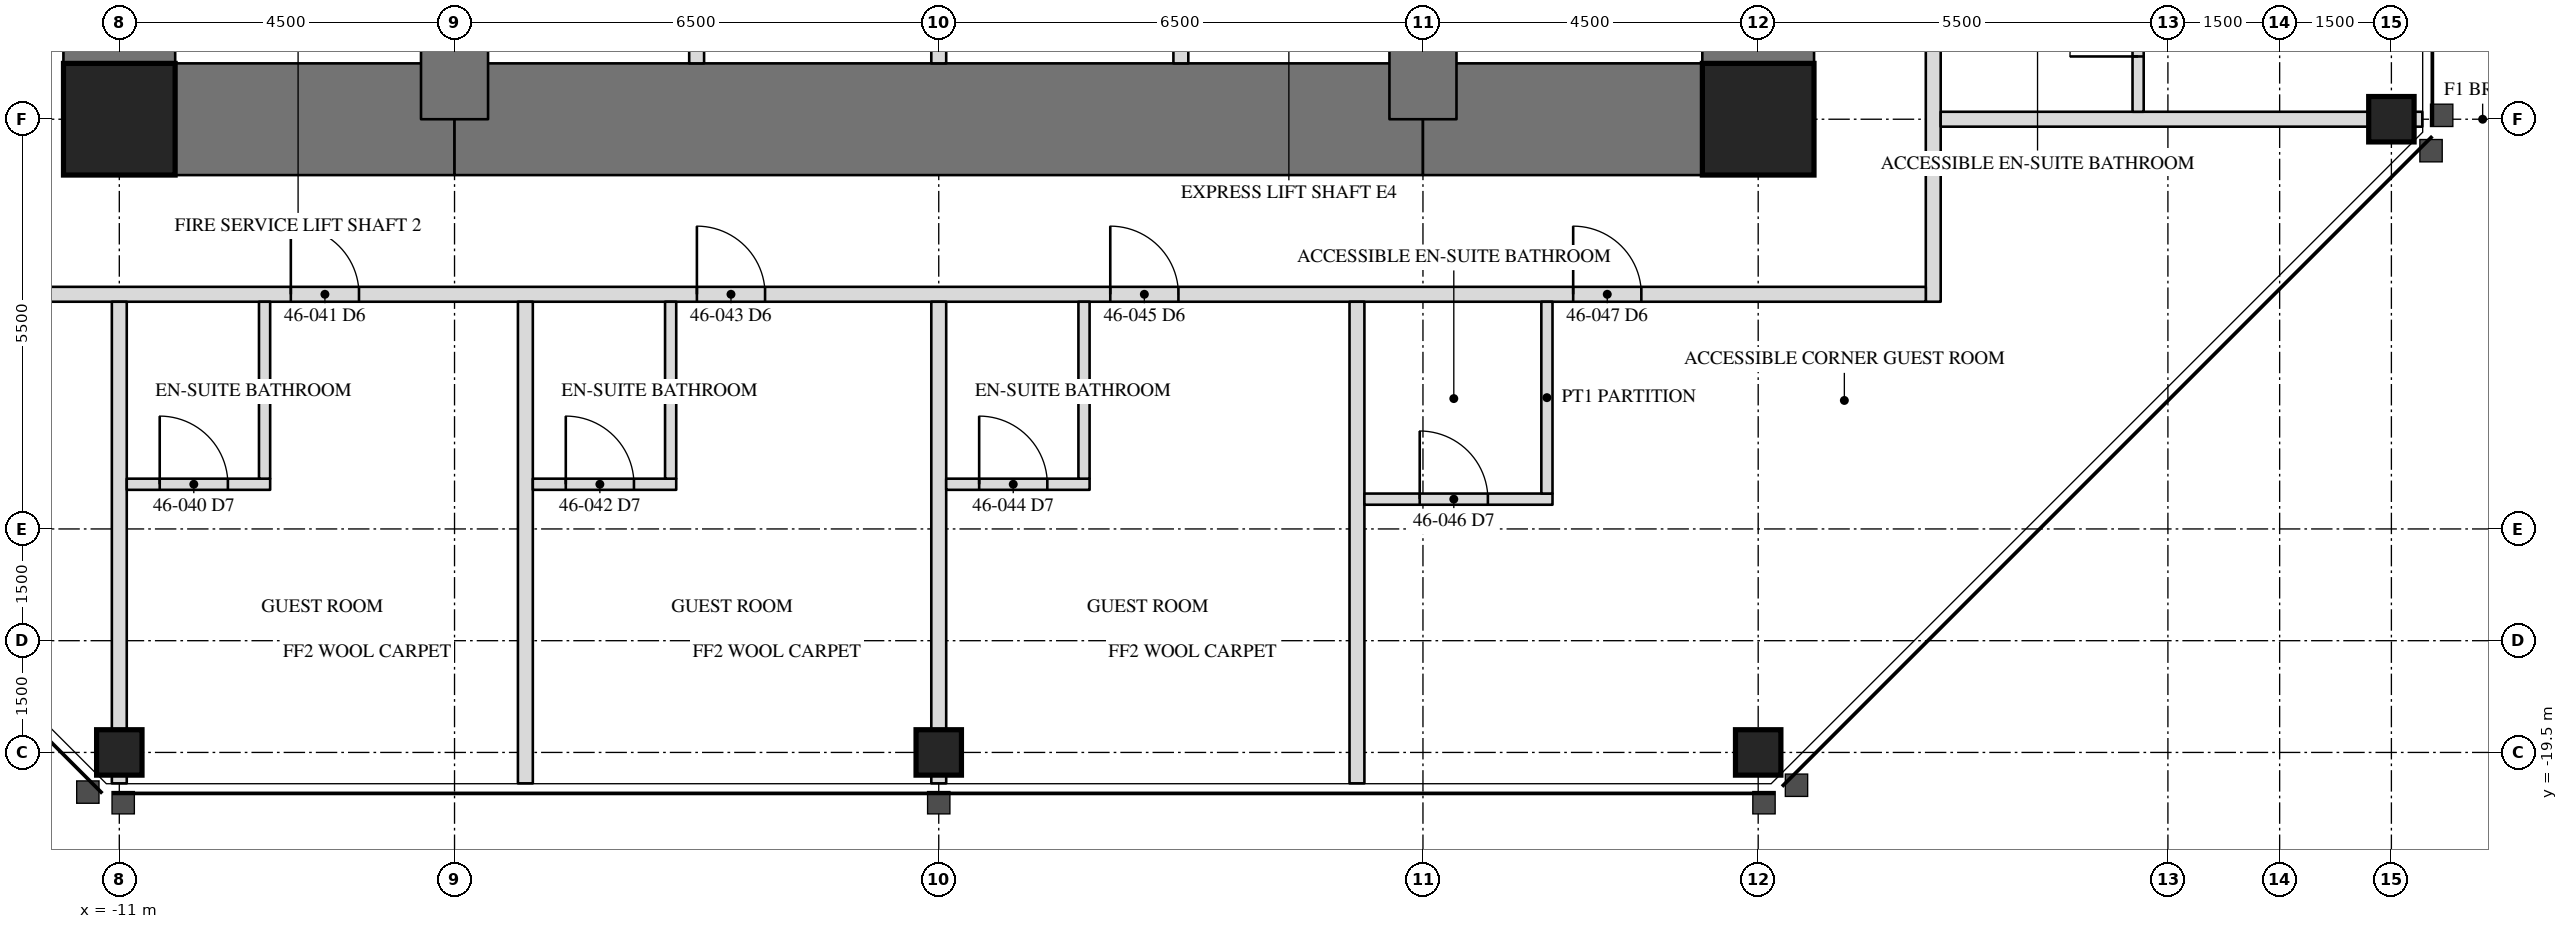
"""IFC4 building model, lengths in metres.
Left out: names, types, materials, properties, quantities, classifications, styles, units other than length and angle.
Written with IfcOpenShell. Run it as: python <this file> out.ifc"""

import sys

from ifc_helpers import new_model, si_unit, direction, frame, frame_2d, origin, origin_2d, place, context, subcontext, project, spatial, rectangle, hollow_rectangle, extrude, element, fill, save


model = new_model("IFC4")
c1 = context("Model", 3, precision=1e-05, world=origin(), true_north=direction((0.0, 1.0)))
c2 = subcontext(c1, "Body", "Model", "MODEL_VIEW")
j1 = project(units=[si_unit("LENGTHUNIT", "METRE"), si_unit("PLANEANGLEUNIT", "RADIAN")], contexts=[c1])
p1 = place(None, origin())
s1 = spatial("IfcSite", under=j1, at=p1, CompositionType="ELEMENT")
p2 = place(p1, origin())
s2 = spatial("IfcBuilding", under=s1, at=p2, CompositionType="ELEMENT")
p3 = place(p2, frame((0.0, 0.0, 197.7)))
s3 = spatial("IfcBuildingStorey", under=s2, at=p3, CompositionType="ELEMENT", Elevation=197.7)
for number, where, z_axis, x_axis in (
    (1, (-11.0, -19.5, 0.0), (0.0, 0.0, 1.0), (1.0, 0.0, 0.0)),
    (2, (0.0, -19.5, 0.0), (0.0, 0.0, 1.0), (1.0, 0.0, 0.0)),
    (3, (11.0, -19.5, 0.0), (0.0, 0.0, 1.0), (1.0, 0.0, 0.0)),
    (4, (19.5, -11.0, 0.0), (0.0, 0.0, 1.0), (0.0, 1.0, 0.0)),
):
    element("IfcColumn", number, at=place(p3, frame(where, z_axis=z_axis, x_axis=x_axis)), inside=s3, PredefinedType="COLUMN", context=c2, shape_type="SweptSolid", body=[
        extrude(hollow_rectangle(XDim=0.61, YDim=0.61, WallThickness=0.076, at=origin_2d()), origin(), (0.0, 0.0, 1.0), 3.5),
    ])
p4 = place(p3, frame((11.0, -11.0, 0.0), z_axis=(0.0, 0.0, 1.0), x_axis=(0.0, 1.0, 0.0)))
e5 = element("IfcWall", 5, at=p4, inside=s3, PredefinedType="SHEAR", context=c2, shape_type="SweptSolid", body=[
    extrude(rectangle(XDim=22.0, YDim=1.5, at=frame_2d((11.0, 0.0))), origin(), (0.0, 0.0, 1.0), 3.5),
])
p5 = place(p4, frame((15.393, 0.0, 0.0)))
e6 = element("IfcOpeningElement", 6, at=p5, cuts=e5, PredefinedType="OPENING", context=c2, shape_type="SweptSolid", body=[
    extrude(rectangle(XDim=0.915, YDim=2.134, at=frame_2d((0.458, 1.067))), frame((0.0, 0.76, 0.0), z_axis=(0.0, -1.0, 0.0), x_axis=(1.0, 0.0, 0.0)), (0.0, 0.0, 1.0), 1.52),
])
p6 = place(p3, frame((-11.0, 11.0, 0.0), z_axis=(0.0, 0.0, 1.0), x_axis=(0.0, -1.0, 0.0)))
e7 = element("IfcWall", 7, at=p6, inside=s3, PredefinedType="SHEAR", context=c2, shape_type="SweptSolid", body=[
    extrude(rectangle(XDim=22.0, YDim=1.5, at=frame_2d((11.0, 0.0))), origin(), (0.0, 0.0, 1.0), 3.5),
])
p7 = place(p6, frame((15.393, 0.0, 0.0)))
e8 = element("IfcOpeningElement", 8, at=p7, cuts=e7, PredefinedType="OPENING", context=c2, shape_type="SweptSolid", body=[
    extrude(rectangle(XDim=0.915, YDim=2.134, at=frame_2d((0.458, 1.067))), frame((0.0, 0.76, 0.0), z_axis=(0.0, -1.0, 0.0), x_axis=(1.0, 0.0, 0.0)), (0.0, 0.0, 1.0), 1.52),
])
p8 = place(p3, frame((-11.0, -11.0, 0.0), z_axis=(0.0, 0.0, 1.0), x_axis=(1.0, 0.0, 0.0)))
e9 = element("IfcWall", 9, at=p8, inside=s3, PredefinedType="SHEAR", context=c2, shape_type="SweptSolid", body=[
    extrude(rectangle(XDim=4.5, YDim=1.5, at=frame_2d((2.25, 0.0))), origin(), (0.0, 0.0, 1.0), 3.5),
])
p9 = place(p3, frame((-6.5, -11.0, 0.0), z_axis=(0.0, 0.0, 1.0), x_axis=(1.0, 0.0, 0.0)))
e10 = element("IfcWall", 10, at=p9, inside=s3, PredefinedType="SHEAR", context=c2, shape_type="SweptSolid", body=[
    extrude(rectangle(XDim=13.0, YDim=1.5, at=frame_2d((6.5, 0.0))), origin(), (0.0, 0.0, 1.0), 3.5),
])
p10 = place(p3, frame((6.5, -11.0, 0.0), z_axis=(0.0, 0.0, 1.0), x_axis=(1.0, 0.0, 0.0)))
e11 = element("IfcWall", 11, at=p10, inside=s3, PredefinedType="SHEAR", context=c2, shape_type="SweptSolid", body=[
    extrude(rectangle(XDim=4.5, YDim=1.5, at=frame_2d((2.25, 0.0))), origin(), (0.0, 0.0, 1.0), 3.5),
])
for number, where, z_axis, x_axis in (
    (12, (6.5, -11.0, 0.0), (0.0, 0.0, 1.0), (0.0, 1.0, 0.0)),
    (13, (-6.5, -6.5, 0.0), (0.0, 0.0, 1.0), (0.0, -1.0, 0.0)),
):
    element("IfcWall", number, at=place(p3, frame(where, z_axis=z_axis, x_axis=x_axis)), inside=s3, PredefinedType="SHEAR", context=c2, shape_type="SweptSolid", body=[
        extrude(rectangle(XDim=4.5, YDim=0.9, at=frame_2d((2.25, 0.0))), origin(), (0.0, 0.0, 1.0), 3.5),
    ])
for number, where, z_axis, x_axis in (
    (14, (-11.0, -11.0, 0.0), (0.0, 0.0, 1.0), (1.0, 0.0, 0.0)),
    (15, (11.0, -11.0, 0.0), (0.0, 0.0, 1.0), (1.0, 0.0, 0.0)),
):
    element("IfcColumn", number, at=place(p3, frame(where, z_axis=z_axis, x_axis=x_axis)), inside=s3, PredefinedType="COLUMN", context=c2, shape_type="SweptSolid", body=[
        extrude(hollow_rectangle(XDim=1.499, YDim=1.499, WallThickness=0.102, at=origin_2d()), origin(), (0.0, 0.0, 1.0), 3.5),
    ])
for number, where, z_axis, x_axis in (
    (16, (-3.25, -10.25, 0.0), (0.0, 0.0, 1.0), (0.0, 1.0, 0.0)),
    (17, (0.0, -10.25, 0.0), (0.0, 0.0, 1.0), (0.0, 1.0, 0.0)),
    (18, (3.25, -10.25, 0.0), (0.0, 0.0, 1.0), (0.0, 1.0, 0.0)),
):
    element("IfcWall", number, at=place(p3, frame(where, z_axis=z_axis, x_axis=x_axis)), inside=s3, PredefinedType="PARTITIONING", context=c2, shape_type="SweptSolid", body=[
        extrude(rectangle(XDim=3.3, YDim=0.2, at=frame_2d((1.65, 0.0))), origin(), (0.0, 0.0, 1.0), 3.31),
    ])
p11 = place(p3, frame((13.35, -13.45, 0.0), z_axis=(0.0, 0.0, 1.0), x_axis=(0.0, 1.0, 0.0)))
e19 = element("IfcWall", 19, at=p11, inside=s3, PredefinedType="PARTITIONING", context=c2, shape_type="SweptSolid", body=[
    extrude(rectangle(XDim=26.7, YDim=0.2, at=frame_2d((13.35, 0.0))), origin(), (0.0, 0.0, 1.0), 3.31),
])
p12 = place(p11, frame((5.353, 0.0, 0.0)))
e20 = element("IfcOpeningElement", 20, at=p12, cuts=e19, PredefinedType="OPENING", context=c2, shape_type="SweptSolid", body=[
    extrude(rectangle(XDim=0.915, YDim=2.134, at=frame_2d((0.458, 1.067))), frame((0.0, 0.11, 0.0), z_axis=(0.0, -1.0, 0.0), x_axis=(1.0, 0.0, 0.0)), (0.0, 0.0, 1.0), 0.22),
])
p13 = place(p11, frame((10.204, 0.0, 0.0)))
e21 = element("IfcOpeningElement", 21, at=p13, cuts=e19, PredefinedType="OPENING", context=c2, shape_type="SweptSolid", body=[
    extrude(rectangle(XDim=0.915, YDim=2.134, at=frame_2d((0.458, 1.067))), frame((0.0, 0.11, 0.0), z_axis=(0.0, -1.0, 0.0), x_axis=(1.0, 0.0, 0.0)), (0.0, 0.0, 1.0), 0.22),
])
p14 = place(p11, frame((15.752, 0.0, 0.0)))
e22 = element("IfcOpeningElement", 22, at=p14, cuts=e19, PredefinedType="OPENING", context=c2, shape_type="SweptSolid", body=[
    extrude(rectangle(XDim=0.915, YDim=2.134, at=frame_2d((0.458, 1.067))), frame((0.0, 0.11, 0.0), z_axis=(0.0, -1.0, 0.0), x_axis=(1.0, 0.0, 0.0)), (0.0, 0.0, 1.0), 0.22),
])
p15 = place(p11, frame((21.366, 0.0, 0.0)))
e23 = element("IfcOpeningElement", 23, at=p15, cuts=e19, PredefinedType="OPENING", context=c2, shape_type="SweptSolid", body=[
    extrude(rectangle(XDim=0.915, YDim=2.134, at=frame_2d((0.458, 1.067))), frame((0.0, 0.11, 0.0), z_axis=(0.0, -1.0, 0.0), x_axis=(1.0, 0.0, 0.0)), (0.0, 0.0, 1.0), 0.22),
])
p16 = place(p3, frame((-13.45, -13.35, 0.0), z_axis=(0.0, 0.0, 1.0), x_axis=(1.0, 0.0, 0.0)))
e24 = element("IfcWall", 24, at=p16, inside=s3, PredefinedType="PARTITIONING", context=c2, shape_type="SweptSolid", body=[
    extrude(rectangle(XDim=26.7, YDim=0.2, at=frame_2d((13.35, 0.0))), origin(), (0.0, 0.0, 1.0), 3.31),
])
p17 = place(p16, frame((4.752, 0.0, 0.0)))
e25 = element("IfcOpeningElement", 25, at=p17, cuts=e24, PredefinedType="OPENING", context=c2, shape_type="SweptSolid", body=[
    extrude(rectangle(XDim=0.915, YDim=2.134, at=frame_2d((0.458, 1.067))), frame((0.0, 0.11, 0.0), z_axis=(0.0, -1.0, 0.0), x_axis=(1.0, 0.0, 0.0)), (0.0, 0.0, 1.0), 0.22),
])
p18 = place(p16, frame((10.204, 0.0, 0.0)))
e26 = element("IfcOpeningElement", 26, at=p18, cuts=e24, PredefinedType="OPENING", context=c2, shape_type="SweptSolid", body=[
    extrude(rectangle(XDim=0.915, YDim=2.134, at=frame_2d((0.458, 1.067))), frame((0.0, 0.11, 0.0), z_axis=(0.0, -1.0, 0.0), x_axis=(1.0, 0.0, 0.0)), (0.0, 0.0, 1.0), 0.22),
])
p19 = place(p16, frame((15.752, 0.0, 0.0)))
e27 = element("IfcOpeningElement", 27, at=p19, cuts=e24, PredefinedType="OPENING", context=c2, shape_type="SweptSolid", body=[
    extrude(rectangle(XDim=0.915, YDim=2.134, at=frame_2d((0.458, 1.067))), frame((0.0, 0.11, 0.0), z_axis=(0.0, -1.0, 0.0), x_axis=(1.0, 0.0, 0.0)), (0.0, 0.0, 1.0), 0.22),
])
p20 = place(p16, frame((21.967, 0.0, 0.0)))
e28 = element("IfcOpeningElement", 28, at=p20, cuts=e24, PredefinedType="OPENING", context=c2, shape_type="SweptSolid", body=[
    extrude(rectangle(XDim=0.915, YDim=2.134, at=frame_2d((0.458, 1.067))), frame((0.0, 0.11, 0.0), z_axis=(0.0, -1.0, 0.0), x_axis=(1.0, 0.0, 0.0)), (0.0, 0.0, 1.0), 0.22),
])
p21 = place(p3, frame((13.45, -11.0, 0.0), z_axis=(0.0, 0.0, 1.0), x_axis=(1.0, 0.0, 0.0)))
e29 = element("IfcWall", 29, at=p21, inside=s3, PredefinedType="PARTITIONING", context=c2, shape_type="SweptSolid", body=[
    extrude(rectangle(XDim=6.465, YDim=0.2, at=frame_2d((3.232, 0.0))), origin(), (0.0, 0.0, 1.0), 2.802),
])
p22 = place(p3, frame((16.1, -10.9, 0.0), z_axis=(0.0, 0.0, 1.0), x_axis=(0.0, 1.0, 0.0)))
e30 = element("IfcWall", 30, at=p22, inside=s3, PredefinedType="PARTITIONING", context=c2, shape_type="SweptSolid", body=[
    extrude(rectangle(XDim=2.525, YDim=0.15, at=frame_2d((1.262, 0.0))), origin(), (0.0, 0.0, 1.0), 3.31),
])
p23 = place(p22, frame((0.742, 0.0, 0.0)))
e31 = element("IfcOpeningElement", 31, at=p23, cuts=e30, PredefinedType="OPENING", context=c2, shape_type="SweptSolid", body=[
    extrude(rectangle(XDim=0.915, YDim=2.032, at=frame_2d((0.458, 1.016))), frame((0.0, 0.085, 0.0), z_axis=(0.0, -1.0, 0.0), x_axis=(1.0, 0.0, 0.0)), (0.0, 0.0, 1.0), 0.17),
])
p24 = place(p3, frame((-11.0, -13.45, 0.0), z_axis=(0.0, 0.0, 1.0), x_axis=(0.0, -1.0, 0.0)))
e32 = element("IfcWall", 32, at=p24, inside=s3, PredefinedType="PARTITIONING", context=c2, shape_type="SweptSolid", body=[
    extrude(rectangle(XDim=6.465, YDim=0.2, at=frame_2d((3.232, 0.0))), origin(), (0.0, 0.0, 1.0), 2.802),
])
p25 = place(p3, frame((-5.549, -13.45, 0.0), z_axis=(0.0, 0.0, 1.0), x_axis=(0.0, -1.0, 0.0)))
e33 = element("IfcWall", 33, at=p25, inside=s3, PredefinedType="PARTITIONING", context=c2, shape_type="SweptSolid", body=[
    extrude(rectangle(XDim=6.465, YDim=0.2, at=frame_2d((3.232, 0.0))), origin(), (0.0, 0.0, 1.0), 3.31),
])
p26 = place(p3, frame((0.0, -13.45, 0.0), z_axis=(0.0, 0.0, 1.0), x_axis=(0.0, -1.0, 0.0)))
e34 = element("IfcWall", 34, at=p26, inside=s3, PredefinedType="PARTITIONING", context=c2, shape_type="SweptSolid", body=[
    extrude(rectangle(XDim=6.465, YDim=0.2, at=frame_2d((3.232, 0.0))), origin(), (0.0, 0.0, 1.0), 2.802),
])
p27 = place(p3, frame((5.614, -13.45, 0.0), z_axis=(0.0, 0.0, 1.0), x_axis=(0.0, -1.0, 0.0)))
e35 = element("IfcWall", 35, at=p27, inside=s3, PredefinedType="PARTITIONING", context=c2, shape_type="SweptSolid", body=[
    extrude(rectangle(XDim=6.465, YDim=0.2, at=frame_2d((3.232, 0.0))), origin(), (0.0, 0.0, 1.0), 3.31),
])
p28 = place(p3, frame((-10.9, -15.9, 0.0), z_axis=(0.0, 0.0, 1.0), x_axis=(1.0, 0.0, 0.0)))
e36 = element("IfcWall", 36, at=p28, inside=s3, PredefinedType="PARTITIONING", context=c2, shape_type="SweptSolid", body=[
    extrude(rectangle(XDim=1.925, YDim=0.15, at=frame_2d((0.962, 0.0))), origin(), (0.0, 0.0, 1.0), 3.31),
])
p29 = place(p28, frame((0.442, 0.0, 0.0)))
e37 = element("IfcOpeningElement", 37, at=p29, cuts=e36, PredefinedType="OPENING", context=c2, shape_type="SweptSolid", body=[
    extrude(rectangle(XDim=0.915, YDim=2.032, at=frame_2d((0.458, 1.016))), frame((0.0, 0.085, 0.0), z_axis=(0.0, -1.0, 0.0), x_axis=(1.0, 0.0, 0.0)), (0.0, 0.0, 1.0), 0.17),
])
p30 = place(p3, frame((-9.05, -13.45, 0.0), z_axis=(0.0, 0.0, 1.0), x_axis=(0.0, -1.0, 0.0)))
e38 = element("IfcWall", 38, at=p30, inside=s3, PredefinedType="PARTITIONING", context=c2, shape_type="SweptSolid", body=[
    extrude(rectangle(XDim=2.375, YDim=0.15, at=frame_2d((1.188, 0.0))), origin(), (0.0, 0.0, 1.0), 3.31),
])
p31 = place(p3, frame((-5.449, -15.9, 0.0), z_axis=(0.0, 0.0, 1.0), x_axis=(1.0, 0.0, 0.0)))
e39 = element("IfcWall", 39, at=p31, inside=s3, PredefinedType="PARTITIONING", context=c2, shape_type="SweptSolid", body=[
    extrude(rectangle(XDim=1.925, YDim=0.15, at=frame_2d((0.962, 0.0))), origin(), (0.0, 0.0, 1.0), 3.31),
])
p32 = place(p31, frame((0.442, 0.0, 0.0)))
e40 = element("IfcOpeningElement", 40, at=p32, cuts=e39, PredefinedType="OPENING", context=c2, shape_type="SweptSolid", body=[
    extrude(rectangle(XDim=0.915, YDim=2.032, at=frame_2d((0.458, 1.016))), frame((0.0, 0.085, 0.0), z_axis=(0.0, -1.0, 0.0), x_axis=(1.0, 0.0, 0.0)), (0.0, 0.0, 1.0), 0.17),
])
p33 = place(p3, frame((-3.599, -13.45, 0.0), z_axis=(0.0, 0.0, 1.0), x_axis=(0.0, -1.0, 0.0)))
e41 = element("IfcWall", 41, at=p33, inside=s3, PredefinedType="PARTITIONING", context=c2, shape_type="SweptSolid", body=[
    extrude(rectangle(XDim=2.375, YDim=0.15, at=frame_2d((1.188, 0.0))), origin(), (0.0, 0.0, 1.0), 2.703),
])
p34 = place(p3, frame((0.1, -15.9, 0.0), z_axis=(0.0, 0.0, 1.0), x_axis=(1.0, 0.0, 0.0)))
e42 = element("IfcWall", 42, at=p34, inside=s3, PredefinedType="PARTITIONING", context=c2, shape_type="SweptSolid", body=[
    extrude(rectangle(XDim=1.925, YDim=0.15, at=frame_2d((0.962, 0.0))), origin(), (0.0, 0.0, 1.0), 3.31),
])
p35 = place(p34, frame((0.442, 0.0, 0.0)))
e43 = element("IfcOpeningElement", 43, at=p35, cuts=e42, PredefinedType="OPENING", context=c2, shape_type="SweptSolid", body=[
    extrude(rectangle(XDim=0.915, YDim=2.032, at=frame_2d((0.458, 1.016))), frame((0.0, 0.085, 0.0), z_axis=(0.0, -1.0, 0.0), x_axis=(1.0, 0.0, 0.0)), (0.0, 0.0, 1.0), 0.17),
])
p36 = place(p3, frame((1.95, -13.45, 0.0), z_axis=(0.0, 0.0, 1.0), x_axis=(0.0, -1.0, 0.0)))
e44 = element("IfcWall", 44, at=p36, inside=s3, PredefinedType="PARTITIONING", context=c2, shape_type="SweptSolid", body=[
    extrude(rectangle(XDim=2.375, YDim=0.15, at=frame_2d((1.188, 0.0))), origin(), (0.0, 0.0, 1.0), 3.31),
])
p37 = place(p3, frame((5.714, -16.1, 0.0), z_axis=(0.0, 0.0, 1.0), x_axis=(1.0, 0.0, 0.0)))
e45 = element("IfcWall", 45, at=p37, inside=s3, PredefinedType="PARTITIONING", context=c2, shape_type="SweptSolid", body=[
    extrude(rectangle(XDim=2.525, YDim=0.15, at=frame_2d((1.262, 0.0))), origin(), (0.0, 0.0, 1.0), 3.31),
])
p38 = place(p37, frame((0.742, 0.0, 0.0)))
e46 = element("IfcOpeningElement", 46, at=p38, cuts=e45, PredefinedType="OPENING", context=c2, shape_type="SweptSolid", body=[
    extrude(rectangle(XDim=0.915, YDim=2.032, at=frame_2d((0.458, 1.016))), frame((0.0, 0.085, 0.0), z_axis=(0.0, -1.0, 0.0), x_axis=(1.0, 0.0, 0.0)), (0.0, 0.0, 1.0), 0.17),
])
p39 = place(p3, frame((8.164, -13.45, 0.0), z_axis=(0.0, 0.0, 1.0), x_axis=(0.0, -1.0, 0.0)))
e47 = element("IfcWall", 47, at=p39, inside=s3, PredefinedType="PARTITIONING", context=c2, shape_type="SweptSolid", body=[
    extrude(rectangle(XDim=2.575, YDim=0.15, at=frame_2d((1.288, 0.0))), origin(), (0.0, 0.0, 1.0), 3.31),
])
p40 = place(p23, origin())
e48 = element("IfcDoor", 48, at=p40, inside=s3, OperationType="SINGLE_SWING_LEFT", PredefinedType="DOOR", context=c2, shape_type="SweptSolid", body=[
    extrude(rectangle(XDim=0.915, YDim=2.032, at=frame_2d((0.458, 1.016))), frame((0.0, 0.025, 0.0), z_axis=(0.0, -1.0, 0.0), x_axis=(1.0, 0.0, 0.0)), (0.0, 0.0, 1.0), 0.05),
])
fill(e31, e48)
p41 = place(p29, origin())
e49 = element("IfcDoor", 49, at=p41, inside=s3, OperationType="SINGLE_SWING_LEFT", PredefinedType="DOOR", context=c2, shape_type="SweptSolid", body=[
    extrude(rectangle(XDim=0.915, YDim=2.032, at=frame_2d((0.458, 1.016))), frame((0.0, 0.025, 0.0), z_axis=(0.0, -1.0, 0.0), x_axis=(1.0, 0.0, 0.0)), (0.0, 0.0, 1.0), 0.05),
])
fill(e37, e49)
p42 = place(p17, origin())
e50 = element("IfcDoor", 50, at=p42, inside=s3, OperationType="SINGLE_SWING_LEFT", PredefinedType="DOOR", context=c2, shape_type="SweptSolid", body=[
    extrude(rectangle(XDim=0.915, YDim=2.134, at=frame_2d((0.458, 1.067))), frame((0.0, 0.025, 0.0), z_axis=(0.0, -1.0, 0.0), x_axis=(1.0, 0.0, 0.0)), (0.0, 0.0, 1.0), 0.05),
])
fill(e25, e50)
p43 = place(p32, origin())
e51 = element("IfcDoor", 51, at=p43, inside=s3, OperationType="SINGLE_SWING_LEFT", PredefinedType="DOOR", context=c2, shape_type="SweptSolid", body=[
    extrude(rectangle(XDim=0.915, YDim=2.032, at=frame_2d((0.458, 1.016))), frame((0.0, 0.025, 0.0), z_axis=(0.0, -1.0, 0.0), x_axis=(1.0, 0.0, 0.0)), (0.0, 0.0, 1.0), 0.05),
])
fill(e40, e51)
p44 = place(p18, origin())
e52 = element("IfcDoor", 52, at=p44, inside=s3, OperationType="SINGLE_SWING_LEFT", PredefinedType="DOOR", context=c2, shape_type="SweptSolid", body=[
    extrude(rectangle(XDim=0.915, YDim=2.134, at=frame_2d((0.458, 1.067))), frame((0.0, 0.025, 0.0), z_axis=(0.0, -1.0, 0.0), x_axis=(1.0, 0.0, 0.0)), (0.0, 0.0, 1.0), 0.05),
])
fill(e26, e52)
p45 = place(p35, origin())
e53 = element("IfcDoor", 53, at=p45, inside=s3, OperationType="SINGLE_SWING_LEFT", PredefinedType="DOOR", context=c2, shape_type="SweptSolid", body=[
    extrude(rectangle(XDim=0.915, YDim=2.032, at=frame_2d((0.458, 1.016))), frame((0.0, 0.025, 0.0), z_axis=(0.0, -1.0, 0.0), x_axis=(1.0, 0.0, 0.0)), (0.0, 0.0, 1.0), 0.05),
])
fill(e43, e53)
p46 = place(p19, origin())
e54 = element("IfcDoor", 54, at=p46, inside=s3, OperationType="SINGLE_SWING_LEFT", PredefinedType="DOOR", context=c2, shape_type="SweptSolid", body=[
    extrude(rectangle(XDim=0.915, YDim=2.134, at=frame_2d((0.458, 1.067))), frame((0.0, 0.025, 0.0), z_axis=(0.0, -1.0, 0.0), x_axis=(1.0, 0.0, 0.0)), (0.0, 0.0, 1.0), 0.05),
])
fill(e27, e54)
p47 = place(p38, origin())
e55 = element("IfcDoor", 55, at=p47, inside=s3, OperationType="SINGLE_SWING_LEFT", PredefinedType="DOOR", context=c2, shape_type="SweptSolid", body=[
    extrude(rectangle(XDim=0.915, YDim=2.032, at=frame_2d((0.458, 1.016))), frame((0.0, 0.025, 0.0), z_axis=(0.0, -1.0, 0.0), x_axis=(1.0, 0.0, 0.0)), (0.0, 0.0, 1.0), 0.05),
])
fill(e46, e55)
p48 = place(p20, origin())
e56 = element("IfcDoor", 56, at=p48, inside=s3, OperationType="SINGLE_SWING_LEFT", PredefinedType="DOOR", context=c2, shape_type="SweptSolid", body=[
    extrude(rectangle(XDim=0.915, YDim=2.134, at=frame_2d((0.458, 1.067))), frame((0.0, 0.025, 0.0), z_axis=(0.0, -1.0, 0.0), x_axis=(1.0, 0.0, 0.0)), (0.0, 0.0, 1.0), 0.05),
])
fill(e28, e56)
save(model, sys.argv[1])
